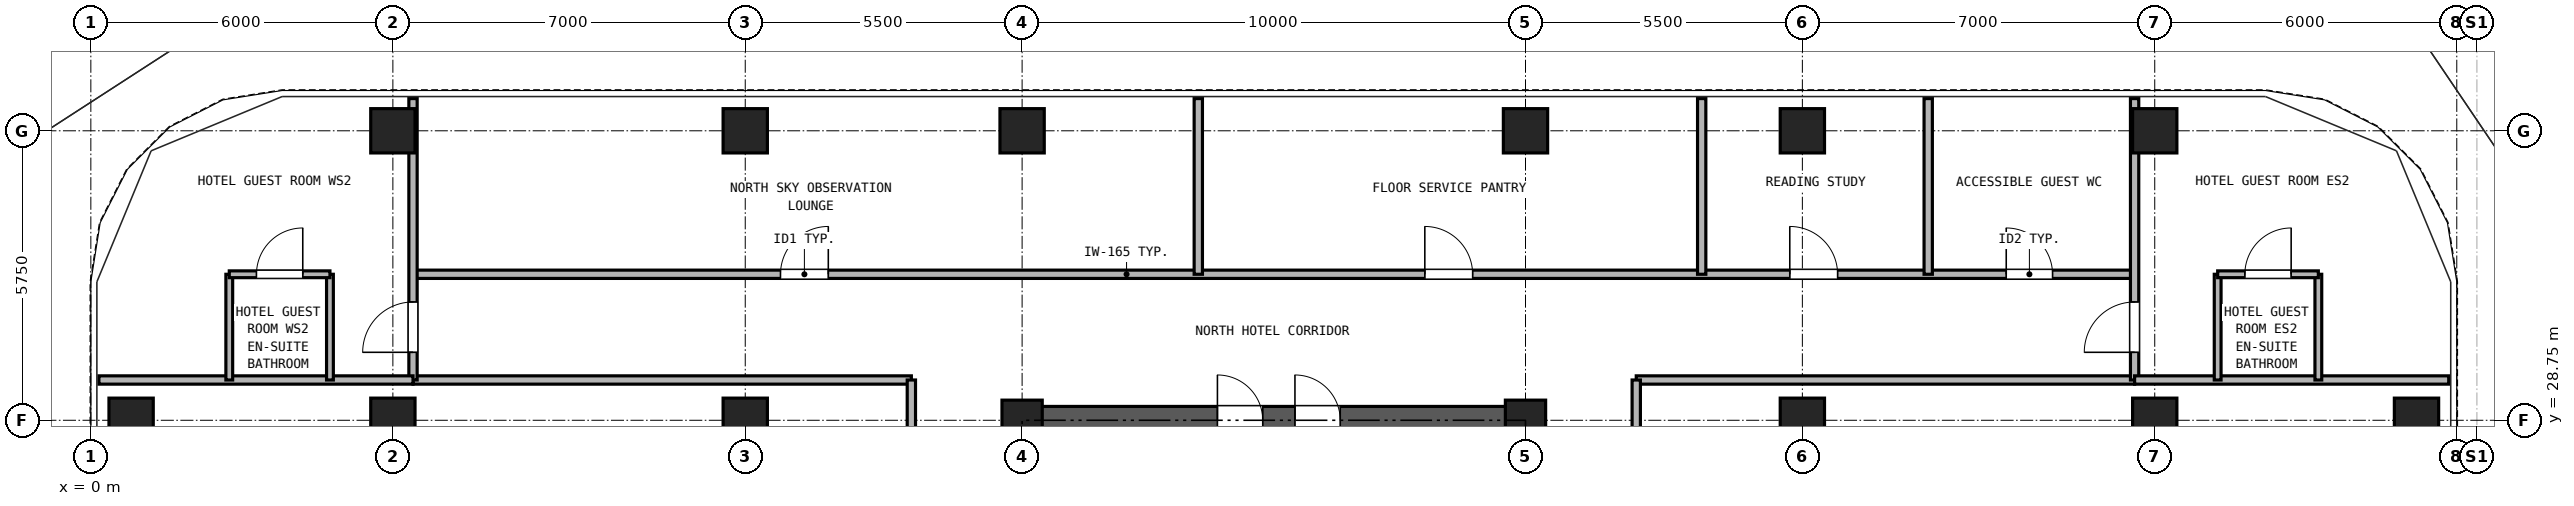
"""IFC4 building model, lengths in metres.
Left out: names, types, materials, properties, quantities, classifications, styles, units other than length and angle.
Written with IfcOpenShell. Run it as: python <this file> out.ifc"""

import sys

from ifc_helpers import new_model, si_unit, direction, frame, frame_2d, origin, origin_2d, place, context, subcontext, project, spatial, rectangle, hollow_rectangle, extrude, source, transform, mapped, element, fill, save


model = new_model("IFC4")
c1 = context("Model", 3, precision=1e-05, world=origin(), true_north=direction((0.0, 1.0)))
c2 = subcontext(c1, "Body", "Model", "MODEL_VIEW")
j1 = project(units=[si_unit("LENGTHUNIT", "METRE"), si_unit("PLANEANGLEUNIT", "RADIAN")], contexts=[c1])
p1 = place(None, origin())
s1 = spatial("IfcSite", under=j1, at=p1, CompositionType="ELEMENT")
p2 = place(p1, origin())
s2 = spatial("IfcBuilding", under=s1, at=p2, CompositionType="ELEMENT")
p3 = place(p2, frame((0.0, 0.0, 108.7)))
s3 = spatial("IfcBuildingStorey", under=s2, at=p3, CompositionType="ELEMENT", Elevation=108.7)
m1 = source(origin(), c2, "Body", "SweptSolid", [
    extrude(hollow_rectangle(XDim=0.88, YDim=0.88, WallThickness=0.05, at=origin_2d()), origin(), (0.0, 0.0, 1.0), 2.95),
])
for number, where, z_axis, x_axis in (
    (1, (6.0, 34.5, 0.0), (0.0, 0.0, 1.0), (1.0, 0.0, 0.0)),
    (2, (13.0, 34.5, 0.0), (0.0, 0.0, 1.0), (1.0, 0.0, 0.0)),
    (3, (18.5, 34.5, 0.0), (0.0, 0.0, 1.0), (1.0, 0.0, 0.0)),
    (4, (28.5, 34.5, 0.0), (0.0, 0.0, 1.0), (1.0, 0.0, 0.0)),
    (5, (34.0, 34.5, 0.0), (0.0, 0.0, 1.0), (1.0, 0.0, 0.0)),
    (6, (41.0, 34.5, 0.0), (0.0, 0.0, 1.0), (1.0, 0.0, 0.0)),
    (7, (0.8, 28.75, 0.0), (0.0, 0.0, 1.0), (1.0, 0.0, 0.0)),
    (8, (46.2, 28.75, 0.0), (0.0, 0.0, 1.0), (1.0, 0.0, 0.0)),
    (9, (6.0, 28.75, 0.0), (0.0, 0.0, 1.0), (1.0, 0.0, 0.0)),
    (10, (13.0, 28.75, 0.0), (0.0, 0.0, 1.0), (1.0, 0.0, 0.0)),
):
    element("IfcColumn", number, at=place(p3, frame(where, z_axis=z_axis, x_axis=x_axis)), inside=s3, PredefinedType="COLUMN", context=c2, shape_type="MappedRepresentation", body=[
        mapped(m1, transform((0.0, 0.0, 0.0), x_axis=(1.0, 0.0, 0.0), y_axis=(0.0, 1.0, 0.0), z_axis=(0.0, 0.0, 1.0), scale=1.0)),
    ])
m2 = source(origin(), c2, "Body", "SweptSolid", [
    extrude(hollow_rectangle(XDim=0.8, YDim=0.8, WallThickness=0.045, at=origin_2d()), origin(), (0.0, 0.0, 1.0), 2.95),
])
for number, where, z_axis, x_axis in (
    (11, (18.5, 28.75, 0.0), (0.0, 0.0, 1.0), (1.0, 0.0, 0.0)),
    (12, (28.5, 28.75, 0.0), (0.0, 0.0, 1.0), (1.0, 0.0, 0.0)),
):
    element("IfcColumn", number, at=place(p3, frame(where, z_axis=z_axis, x_axis=x_axis)), inside=s3, PredefinedType="COLUMN", context=c2, shape_type="MappedRepresentation", body=[
        mapped(m2, transform((0.0, 0.0, 0.0), x_axis=(1.0, 0.0, 0.0), y_axis=(0.0, 1.0, 0.0), z_axis=(0.0, 0.0, 1.0), scale=1.0)),
    ])
for number, where, z_axis, x_axis in (
    (13, (34.0, 28.75, 0.0), (0.0, 0.0, 1.0), (1.0, 0.0, 0.0)),
    (14, (41.0, 28.75, 0.0), (0.0, 0.0, 1.0), (1.0, 0.0, 0.0)),
):
    element("IfcColumn", number, at=place(p3, frame(where, z_axis=z_axis, x_axis=x_axis)), inside=s3, PredefinedType="COLUMN", context=c2, shape_type="MappedRepresentation", body=[
        mapped(m1, transform((0.0, 0.0, 0.0), x_axis=(1.0, 0.0, 0.0), y_axis=(0.0, 1.0, 0.0), z_axis=(0.0, 0.0, 1.0), scale=1.0)),
    ])
p4 = place(p3, frame((18.225, 28.75, 0.0), z_axis=(0.0, 0.0, 1.0), x_axis=(1.0, 0.0, 0.0)))
e15 = element("IfcWall", 15, at=p4, inside=s3, PredefinedType="SHEAR", context=c2, shape_type="SweptSolid", body=[
    extrude(rectangle(XDim=10.55, YDim=0.55, at=frame_2d((5.275, 0.0))), origin(), (0.0, 0.0, 1.0), 2.95),
])
p5 = place(p4, frame((4.155, 0.0, 0.0)))
e16 = element("IfcOpeningElement", 16, at=p5, cuts=e15, PredefinedType="OPENING", context=c2, shape_type="SweptSolid", body=[
    extrude(rectangle(XDim=0.9, YDim=2.05, at=frame_2d((0.45, 1.025))), frame((0.0, 0.285, 0.0), z_axis=(0.0, -1.0, 0.0), x_axis=(1.0, 0.0, 0.0)), (0.0, 0.0, 1.0), 0.57),
])
p6 = place(p4, frame((5.695, 0.0, 0.0)))
e17 = element("IfcOpeningElement", 17, at=p6, cuts=e15, PredefinedType="OPENING", context=c2, shape_type="SweptSolid", body=[
    extrude(rectangle(XDim=0.9, YDim=2.05, at=frame_2d((0.45, 1.025))), frame((0.0, 0.285, 0.0), z_axis=(0.0, -1.0, 0.0), x_axis=(1.0, 0.0, 0.0)), (0.0, 0.0, 1.0), 0.57),
])
p7 = place(p3, frame((6.4, 31.65, 0.0), z_axis=(0.0, 0.0, 1.0), x_axis=(1.0, 0.0, 0.0)))
e18 = element("IfcWall", 18, at=p7, inside=s3, PredefinedType="PARTITIONING", context=c2, shape_type="SweptSolid", body=[
    extrude(rectangle(XDim=34.2, YDim=0.165, at=frame_2d((17.1, 0.0))), origin(), (0.0, 0.0, 1.0), 2.583),
])
p8 = place(p7, frame((7.3, 0.0, 0.0)))
e19 = element("IfcOpeningElement", 19, at=p8, cuts=e18, PredefinedType="OPENING", context=c2, shape_type="SweptSolid", body=[
    extrude(rectangle(XDim=0.95, YDim=2.15, at=frame_2d((0.475, 1.075))), frame((0.0, 0.093, 0.0), z_axis=(0.0, -1.0, 0.0), x_axis=(1.0, 0.0, 0.0)), (0.0, 0.0, 1.0), 0.185),
])
p9 = place(p7, frame((20.1, 0.0, 0.0)))
e20 = element("IfcOpeningElement", 20, at=p9, cuts=e18, PredefinedType="OPENING", context=c2, shape_type="SweptSolid", body=[
    extrude(rectangle(XDim=0.95, YDim=2.15, at=frame_2d((0.475, 1.075))), frame((0.0, 0.093, 0.0), z_axis=(0.0, -1.0, 0.0), x_axis=(1.0, 0.0, 0.0)), (0.0, 0.0, 1.0), 0.185),
])
p10 = place(p7, frame((27.35, 0.0, 0.0)))
e21 = element("IfcOpeningElement", 21, at=p10, cuts=e18, PredefinedType="OPENING", context=c2, shape_type="SweptSolid", body=[
    extrude(rectangle(XDim=0.95, YDim=2.15, at=frame_2d((0.475, 1.075))), frame((0.0, 0.093, 0.0), z_axis=(0.0, -1.0, 0.0), x_axis=(1.0, 0.0, 0.0)), (0.0, 0.0, 1.0), 0.185),
])
p11 = place(p7, frame((31.65, 0.0, 0.0)))
e22 = element("IfcOpeningElement", 22, at=p11, cuts=e18, PredefinedType="OPENING", context=c2, shape_type="SweptSolid", body=[
    extrude(rectangle(XDim=0.92, YDim=2.1, at=frame_2d((0.46, 1.05))), frame((0.0, 0.093, 0.0), z_axis=(0.0, -1.0, 0.0), x_axis=(1.0, 0.0, 0.0)), (0.0, 0.0, 1.0), 0.185),
])
for number, where, z_axis, x_axis in (
    (23, (6.4, 29.55, 0.0), (0.0, 0.0, 1.0), (1.0, 0.0, 0.0)),
    (24, (30.7, 29.55, 0.0), (0.0, 0.0, 1.0), (1.0, 0.0, 0.0)),
):
    element("IfcWall", number, at=place(p3, frame(where, z_axis=z_axis, x_axis=x_axis)), inside=s3, PredefinedType="PARTITIONING", context=c2, shape_type="SweptSolid", body=[
        extrude(rectangle(XDim=9.9, YDim=0.165, at=frame_2d((4.95, 0.0))), origin(), (0.0, 0.0, 1.0), 2.95),
    ])
p12 = place(p3, frame((16.3, 11.1, 0.0), z_axis=(0.0, 0.0, 1.0), x_axis=(0.0, 1.0, 0.0)))
e25 = element("IfcWall", 25, at=p12, inside=s3, PredefinedType="PARTITIONING", context=c2, shape_type="SweptSolid", body=[
    extrude(rectangle(XDim=18.45, YDim=0.165, at=frame_2d((9.225, 0.0))), origin(), (0.0, 0.0, 1.0), 2.95),
])
p13 = place(p12, frame((2.5, 0.0, 0.0)))
e26 = element("IfcOpeningElement", 26, at=p13, cuts=e25, PredefinedType="OPENING", context=c2, shape_type="SweptSolid", body=[
    extrude(rectangle(XDim=0.95, YDim=2.15, at=frame_2d((0.475, 1.075))), frame((0.0, 0.093, 0.0), z_axis=(0.0, -1.0, 0.0), x_axis=(1.0, 0.0, 0.0)), (0.0, 0.0, 1.0), 0.185),
])
p14 = place(p12, frame((8.5, 0.0, 0.0)))
e27 = element("IfcOpeningElement", 27, at=p14, cuts=e25, PredefinedType="OPENING", context=c2, shape_type="SweptSolid", body=[
    extrude(rectangle(XDim=0.95, YDim=2.15, at=frame_2d((0.475, 1.075))), frame((0.0, 0.093, 0.0), z_axis=(0.0, -1.0, 0.0), x_axis=(1.0, 0.0, 0.0)), (0.0, 0.0, 1.0), 0.185),
])
p15 = place(p12, frame((14.725, 0.0, 0.0)))
e28 = element("IfcOpeningElement", 28, at=p15, cuts=e25, PredefinedType="OPENING", context=c2, shape_type="SweptSolid", body=[
    extrude(rectangle(XDim=0.95, YDim=2.15, at=frame_2d((0.475, 1.075))), frame((0.0, 0.093, 0.0), z_axis=(0.0, -1.0, 0.0), x_axis=(1.0, 0.0, 0.0)), (0.0, 0.0, 1.0), 0.185),
])
p16 = place(p3, frame((30.7, 11.1, 0.0), z_axis=(0.0, 0.0, 1.0), x_axis=(0.0, 1.0, 0.0)))
e29 = element("IfcWall", 29, at=p16, inside=s3, PredefinedType="PARTITIONING", context=c2, shape_type="SweptSolid", body=[
    extrude(rectangle(XDim=18.45, YDim=0.165, at=frame_2d((9.225, 0.0))), origin(), (0.0, 0.0, 1.0), 2.95),
])
p17 = place(p16, frame((4.112, 0.0, 0.0)))
e30 = element("IfcOpeningElement", 30, at=p17, cuts=e29, PredefinedType="OPENING", context=c2, shape_type="SweptSolid", body=[
    extrude(rectangle(XDim=0.95, YDim=2.15, at=frame_2d((0.475, 1.075))), frame((0.0, 0.093, 0.0), z_axis=(0.0, -1.0, 0.0), x_axis=(1.0, 0.0, 0.0)), (0.0, 0.0, 1.0), 0.185),
])
p18 = place(p16, frame((13.338, 0.0, 0.0)))
e31 = element("IfcOpeningElement", 31, at=p18, cuts=e29, PredefinedType="OPENING", context=c2, shape_type="SweptSolid", body=[
    extrude(rectangle(XDim=0.95, YDim=2.15, at=frame_2d((0.475, 1.075))), frame((0.0, 0.093, 0.0), z_axis=(0.0, -1.0, 0.0), x_axis=(1.0, 0.0, 0.0)), (0.0, 0.0, 1.0), 0.185),
])
p19 = place(p3, frame((6.4, 29.55, 0.0), z_axis=(0.0, 0.0, 1.0), x_axis=(0.0, 1.0, 0.0)))
e32 = element("IfcWall", 32, at=p19, inside=s3, PredefinedType="PARTITIONING", context=c2, shape_type="SweptSolid", body=[
    extrude(rectangle(XDim=5.59, YDim=0.165, at=frame_2d((2.795, 0.0))), origin(), (0.0, 0.0, 1.0), 2.95),
])
p20 = place(p19, frame((0.55, 0.0, 0.0)))
e33 = element("IfcOpeningElement", 33, at=p20, cuts=e32, PredefinedType="OPENING", context=c2, shape_type="SweptSolid", body=[
    extrude(rectangle(XDim=1.0, YDim=2.15, at=frame_2d((0.5, 1.075))), frame((0.0, 0.093, 0.0), z_axis=(0.0, -1.0, 0.0), x_axis=(1.0, 0.0, 0.0)), (0.0, 0.0, 1.0), 0.185),
])
p21 = place(p3, frame((40.6, 29.55, 0.0), z_axis=(0.0, 0.0, 1.0), x_axis=(0.0, 1.0, 0.0)))
e34 = element("IfcWall", 34, at=p21, inside=s3, PredefinedType="PARTITIONING", context=c2, shape_type="SweptSolid", body=[
    extrude(rectangle(XDim=5.59, YDim=0.165, at=frame_2d((2.795, 0.0))), origin(), (0.0, 0.0, 1.0), 2.95),
])
p22 = place(p21, frame((0.55, 0.0, 0.0)))
e35 = element("IfcOpeningElement", 35, at=p22, cuts=e34, PredefinedType="OPENING", context=c2, shape_type="SweptSolid", body=[
    extrude(rectangle(XDim=1.0, YDim=2.15, at=frame_2d((0.5, 1.075))), frame((0.0, 0.093, 0.0), z_axis=(0.0, -1.0, 0.0), x_axis=(1.0, 0.0, 0.0)), (0.0, 0.0, 1.0), 0.185),
])
for number, where, z_axis, x_axis in (
    (36, (0.16, 29.55, 0.0), (0.0, 0.0, 1.0), (1.0, 0.0, 0.0)),
    (37, (40.6, 29.55, 0.0), (0.0, 0.0, 1.0), (1.0, 0.0, 0.0)),
):
    element("IfcWall", number, at=place(p3, frame(where, z_axis=z_axis, x_axis=x_axis)), inside=s3, PredefinedType="PARTITIONING", context=c2, shape_type="SweptSolid", body=[
        extrude(rectangle(XDim=6.24, YDim=0.165, at=frame_2d((3.12, 0.0))), origin(), (0.0, 0.0, 1.0), 2.95),
    ])
for number, where, z_axis, x_axis in (
    (38, (2.75, 29.55, 0.0), (0.0, 0.0, 1.0), (0.0, 1.0, 0.0)),
    (39, (4.75, 29.55, 0.0), (0.0, 0.0, 1.0), (0.0, 1.0, 0.0)),
):
    element("IfcWall", number, at=place(p3, frame(where, z_axis=z_axis, x_axis=x_axis)), inside=s3, PredefinedType="PARTITIONING", context=c2, shape_type="SweptSolid", body=[
        extrude(rectangle(XDim=2.1, YDim=0.135, at=frame_2d((1.05, 0.0))), origin(), (0.0, 0.0, 1.0), 2.95),
    ])
p23 = place(p3, frame((2.75, 31.65, 0.0), z_axis=(0.0, 0.0, 1.0), x_axis=(1.0, 0.0, 0.0)))
e40 = element("IfcWall", 40, at=p23, inside=s3, PredefinedType="PARTITIONING", context=c2, shape_type="SweptSolid", body=[
    extrude(rectangle(XDim=2.0, YDim=0.135, at=frame_2d((1.0, 0.0))), origin(), (0.0, 0.0, 1.0), 2.95),
])
p24 = place(p23, frame((0.54, 0.0, 0.0)))
e41 = element("IfcOpeningElement", 41, at=p24, cuts=e40, PredefinedType="OPENING", context=c2, shape_type="SweptSolid", body=[
    extrude(rectangle(XDim=0.92, YDim=2.1, at=frame_2d((0.46, 1.05))), frame((0.0, 0.077, 0.0), z_axis=(0.0, -1.0, 0.0), x_axis=(1.0, 0.0, 0.0)), (0.0, 0.0, 1.0), 0.155),
])
for number, where, z_axis, x_axis in (
    (42, (42.25, 29.55, 0.0), (0.0, 0.0, 1.0), (0.0, 1.0, 0.0)),
    (43, (44.25, 29.55, 0.0), (0.0, 0.0, 1.0), (0.0, 1.0, 0.0)),
):
    element("IfcWall", number, at=place(p3, frame(where, z_axis=z_axis, x_axis=x_axis)), inside=s3, PredefinedType="PARTITIONING", context=c2, shape_type="SweptSolid", body=[
        extrude(rectangle(XDim=2.1, YDim=0.135, at=frame_2d((1.05, 0.0))), origin(), (0.0, 0.0, 1.0), 2.95),
    ])
p25 = place(p3, frame((42.25, 31.65, 0.0), z_axis=(0.0, 0.0, 1.0), x_axis=(1.0, 0.0, 0.0)))
e44 = element("IfcWall", 44, at=p25, inside=s3, PredefinedType="PARTITIONING", context=c2, shape_type="SweptSolid", body=[
    extrude(rectangle(XDim=2.0, YDim=0.135, at=frame_2d((1.0, 0.0))), origin(), (0.0, 0.0, 1.0), 2.95),
])
p26 = place(p25, frame((0.54, 0.0, 0.0)))
e45 = element("IfcOpeningElement", 45, at=p26, cuts=e44, PredefinedType="OPENING", context=c2, shape_type="SweptSolid", body=[
    extrude(rectangle(XDim=0.92, YDim=2.1, at=frame_2d((0.46, 1.05))), frame((0.0, 0.077, 0.0), z_axis=(0.0, -1.0, 0.0), x_axis=(1.0, 0.0, 0.0)), (0.0, 0.0, 1.0), 0.155),
])
for number, where, z_axis, x_axis in (
    (46, (22.0, 31.65, 0.0), (0.0, 0.0, 1.0), (0.0, 1.0, 0.0)),
    (47, (32.0, 31.65, 0.0), (0.0, 0.0, 1.0), (0.0, 1.0, 0.0)),
    (48, (36.5, 31.65, 0.0), (0.0, 0.0, 1.0), (0.0, 1.0, 0.0)),
):
    element("IfcWall", number, at=place(p3, frame(where, z_axis=z_axis, x_axis=x_axis)), inside=s3, PredefinedType="PARTITIONING", context=c2, shape_type="SweptSolid", body=[
        extrude(rectangle(XDim=3.49, YDim=0.165, at=frame_2d((1.745, 0.0))), origin(), (0.0, 0.0, 1.0), 2.95),
    ])
p27 = place(p5, origin())
e49 = element("IfcDoor", 49, at=p27, inside=s3, OperationType="SINGLE_SWING_LEFT", PredefinedType="DOOR", context=c2, shape_type="SweptSolid", body=[
    extrude(rectangle(XDim=0.9, YDim=2.05, at=frame_2d((0.45, 1.025))), frame((0.0, 0.025, 0.0), z_axis=(0.0, -1.0, 0.0), x_axis=(1.0, 0.0, 0.0)), (0.0, 0.0, 1.0), 0.05),
])
fill(e16, e49)
p28 = place(p6, origin())
e50 = element("IfcDoor", 50, at=p28, inside=s3, OperationType="SINGLE_SWING_LEFT", PredefinedType="DOOR", context=c2, shape_type="SweptSolid", body=[
    extrude(rectangle(XDim=0.9, YDim=2.05, at=frame_2d((0.45, 1.025))), frame((0.0, 0.025, 0.0), z_axis=(0.0, -1.0, 0.0), x_axis=(1.0, 0.0, 0.0)), (0.0, 0.0, 1.0), 0.05),
])
fill(e17, e50)
p29 = place(p24, frame((0.92, 0.0, 0.0), z_axis=(0.0, 0.0, 1.0), x_axis=(-1.0, 0.0, 0.0)))
e51 = element("IfcDoor", 51, at=p29, inside=s3, OperationType="SINGLE_SWING_RIGHT", PredefinedType="DOOR", context=c2, shape_type="SweptSolid", body=[
    extrude(rectangle(XDim=0.92, YDim=2.1, at=frame_2d((0.46, 1.05))), frame((0.0, 0.025, 0.0), z_axis=(0.0, -1.0, 0.0), x_axis=(1.0, 0.0, 0.0)), (0.0, 0.0, 1.0), 0.05),
])
fill(e41, e51)
p30 = place(p20, origin())
e52 = element("IfcDoor", 52, at=p30, inside=s3, OperationType="SINGLE_SWING_LEFT", PredefinedType="DOOR", context=c2, shape_type="SweptSolid", body=[
    extrude(rectangle(XDim=1.0, YDim=2.15, at=frame_2d((0.5, 1.075))), frame((0.0, 0.025, 0.0), z_axis=(0.0, -1.0, 0.0), x_axis=(1.0, 0.0, 0.0)), (0.0, 0.0, 1.0), 0.05),
])
fill(e33, e52)
p31 = place(p26, frame((0.92, 0.0, 0.0), z_axis=(0.0, 0.0, 1.0), x_axis=(-1.0, 0.0, 0.0)))
e53 = element("IfcDoor", 53, at=p31, inside=s3, OperationType="SINGLE_SWING_RIGHT", PredefinedType="DOOR", context=c2, shape_type="SweptSolid", body=[
    extrude(rectangle(XDim=0.92, YDim=2.1, at=frame_2d((0.46, 1.05))), frame((0.0, 0.025, 0.0), z_axis=(0.0, -1.0, 0.0), x_axis=(1.0, 0.0, 0.0)), (0.0, 0.0, 1.0), 0.05),
])
fill(e45, e53)
p32 = place(p22, frame((1.0, 0.0, 0.0), z_axis=(0.0, 0.0, 1.0), x_axis=(-1.0, 0.0, 0.0)))
e54 = element("IfcDoor", 54, at=p32, inside=s3, OperationType="SINGLE_SWING_LEFT", PredefinedType="DOOR", context=c2, shape_type="SweptSolid", body=[
    extrude(rectangle(XDim=1.0, YDim=2.15, at=frame_2d((0.5, 1.075))), frame((0.0, 0.025, 0.0), z_axis=(0.0, -1.0, 0.0), x_axis=(1.0, 0.0, 0.0)), (0.0, 0.0, 1.0), 0.05),
])
fill(e35, e54)
p33 = place(p8, origin())
e55 = element("IfcDoor", 55, at=p33, inside=s3, OperationType="SINGLE_SWING_RIGHT", PredefinedType="DOOR", context=c2, shape_type="SweptSolid", body=[
    extrude(rectangle(XDim=0.95, YDim=2.15, at=frame_2d((0.475, 1.075))), frame((0.0, 0.025, 0.0), z_axis=(0.0, -1.0, 0.0), x_axis=(1.0, 0.0, 0.0)), (0.0, 0.0, 1.0), 0.05),
])
fill(e19, e55)
p34 = place(p9, origin())
e56 = element("IfcDoor", 56, at=p34, inside=s3, OperationType="SINGLE_SWING_LEFT", PredefinedType="DOOR", context=c2, shape_type="SweptSolid", body=[
    extrude(rectangle(XDim=0.95, YDim=2.15, at=frame_2d((0.475, 1.075))), frame((0.0, 0.025, 0.0), z_axis=(0.0, -1.0, 0.0), x_axis=(1.0, 0.0, 0.0)), (0.0, 0.0, 1.0), 0.05),
])
fill(e20, e56)
p35 = place(p10, origin())
e57 = element("IfcDoor", 57, at=p35, inside=s3, OperationType="SINGLE_SWING_LEFT", PredefinedType="DOOR", context=c2, shape_type="SweptSolid", body=[
    extrude(rectangle(XDim=0.95, YDim=2.15, at=frame_2d((0.475, 1.075))), frame((0.0, 0.025, 0.0), z_axis=(0.0, -1.0, 0.0), x_axis=(1.0, 0.0, 0.0)), (0.0, 0.0, 1.0), 0.05),
])
fill(e21, e57)
p36 = place(p11, origin())
e58 = element("IfcDoor", 58, at=p36, inside=s3, OperationType="SINGLE_SWING_LEFT", PredefinedType="DOOR", context=c2, shape_type="SweptSolid", body=[
    extrude(rectangle(XDim=0.92, YDim=2.1, at=frame_2d((0.46, 1.05))), frame((0.0, 0.025, 0.0), z_axis=(0.0, -1.0, 0.0), x_axis=(1.0, 0.0, 0.0)), (0.0, 0.0, 1.0), 0.05),
])
fill(e22, e58)
save(model, sys.argv[1])
